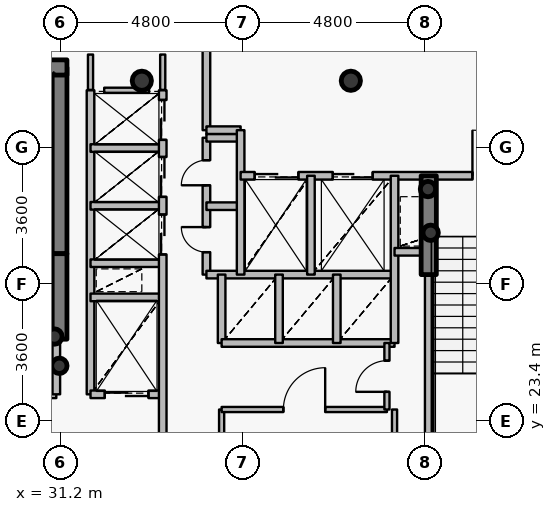
"""IFC4 building model, lengths in metres.
Left out: names, types, materials, properties, quantities, classifications, styles, units other than length and angle.
Written with IfcOpenShell. Run it as: python <this file> out.ifc"""

import sys

from ifc_helpers import new_model, si_unit, direction, frame, frame_2d, origin, origin_2d, place, context, subcontext, project, spatial, rectangle, hollow_circle, extrude, source, transform, mapped, element, fill, save


model = new_model("IFC4")
c1 = context("Model", 3, precision=1e-05, world=origin(), true_north=direction((0.0, 1.0)))
c2 = subcontext(c1, "Body", "Model", "MODEL_VIEW")
j1 = project(units=[si_unit("LENGTHUNIT", "METRE"), si_unit("PLANEANGLEUNIT", "RADIAN")], contexts=[c1])
p1 = place(None, origin())
s1 = spatial("IfcSite", under=j1, at=p1, CompositionType="ELEMENT")
p2 = place(p1, origin())
s2 = spatial("IfcBuilding", under=s1, at=p2, CompositionType="ELEMENT")
p3 = place(p2, frame((0.0, 0.0, 240.3)))
s3 = spatial("IfcBuildingStorey", under=s2, at=p3, CompositionType="ELEMENT", Elevation=240.3)
for number, where, z_axis, x_axis in (
    (1, (38.85, 32.35, 0.0), (0.0, 0.0, 1.0), (1.0, 0.0, 0.0)),
    (2, (33.35, 32.35, 0.0), (0.0, 0.0, 1.0), (1.0, 0.0, 0.0)),
):
    element("IfcColumn", number, at=place(p3, frame(where, z_axis=z_axis, x_axis=x_axis)), inside=s3, PredefinedType="COLUMN", context=c2, shape_type="SweptSolid", body=[
        extrude(hollow_circle(Radius=0.254, WallThickness=0.02, at=origin_2d()), origin(), (0.0, 0.0, 1.0), 3.75),
    ])
p4 = place(p3, frame((31.18, 27.8, 0.0), z_axis=(0.0, 0.0, 1.0), x_axis=(0.0, 1.0, 0.0)))
e3 = element("IfcWall", 3, at=p4, inside=s3, PredefinedType="SHEAR", context=c2, shape_type="SweptSolid", body=[
    extrude(rectangle(XDim=4.9, YDim=0.4, at=frame_2d((2.45, 0.0))), origin(), (0.0, 0.0, 1.0), 3.75),
])
p5 = place(p3, frame((27.28, 32.7, 0.0), z_axis=(0.0, 0.0, 1.0), x_axis=(1.0, 0.0, 0.0)))
e4 = element("IfcWall", 4, at=p5, inside=s3, PredefinedType="SHEAR", context=c2, shape_type="SweptSolid", body=[
    extrude(rectangle(XDim=4.1, YDim=0.4, at=frame_2d((2.05, 0.0))), origin(), (0.0, 0.0, 1.0), 3.75),
])
for number, where, z_axis, x_axis in (
    (5, (31.05, 25.62, 0.0), (0.0, 0.0, 1.0), (1.0, 0.0, 0.0)),
    (6, (31.18, 24.85, 0.0), (0.0, 0.0, 1.0), (1.0, 0.0, 0.0)),
    (7, (40.95, 28.35, 0.0), (0.0, 0.0, 1.0), (1.0, 0.0, 0.0)),
    (8, (40.88, 29.5, 0.0), (0.0, 0.0, 1.0), (1.0, 0.0, 0.0)),
):
    element("IfcColumn", number, at=place(p3, frame(where, z_axis=z_axis, x_axis=x_axis)), inside=s3, PredefinedType="COLUMN", context=c2, shape_type="SweptSolid", body=[
        extrude(hollow_circle(Radius=0.203, WallThickness=0.016, at=origin_2d()), origin(), (0.0, 0.0, 1.0), 3.75),
    ])
p6 = place(p3, frame((31.18, 25.55, 0.0), z_axis=(0.0, 0.0, 1.0), x_axis=(0.0, 1.0, 0.0)))
e9 = element("IfcWall", 9, at=p6, inside=s3, PredefinedType="SHEAR", context=c2, shape_type="SweptSolid", body=[
    extrude(rectangle(XDim=2.25, YDim=0.4, at=frame_2d((1.125, 0.0))), origin(), (0.0, 0.0, 1.0), 3.1),
])
p7 = place(p3, frame((40.9, 27.25, 0.0), z_axis=(0.0, 0.0, 1.0), x_axis=(0.0, 1.0, 0.0)))
e10 = element("IfcWall", 10, at=p7, inside=s3, PredefinedType="SHEAR", context=c2, shape_type="SweptSolid", body=[
    extrude(rectangle(XDim=2.6, YDim=0.4, at=frame_2d((1.3, 0.0))), origin(), (0.0, 0.0, 1.0), 3.1),
])
p8 = place(p3, frame((27.56, 24.1, 0.0), z_axis=(0.0, 0.0, 1.0), x_axis=(1.0, 0.0, 0.0)))
e11 = element("IfcWall", 11, at=p8, inside=s3, PredefinedType="PARTITIONING", context=c2, shape_type="SweptSolid", body=[
    extrude(rectangle(XDim=3.54, YDim=0.2, at=frame_2d((1.77, 0.0))), origin(), (0.0, 0.0, 1.0), 3.5),
])
p9 = place(p8, frame((1.17, 0.0, 0.0)))
e12 = element("IfcOpeningElement", 12, at=p9, cuts=e11, PredefinedType="OPENING", context=c2, shape_type="SweptSolid", body=[
    extrude(rectangle(XDim=1.2, YDim=2.15, at=origin_2d()), frame((0.6, 0.11, 1.075), z_axis=(0.0, -1.0, 0.0), x_axis=(1.0, 0.0, 0.0)), (0.0, 0.0, 1.0), 0.22),
])
p10 = place(p3, frame((31.1, 24.1, 0.0), z_axis=(0.0, 0.0, 1.0), x_axis=(0.0, 1.0, 0.0)))
e13 = element("IfcWall", 13, at=p10, inside=s3, PredefinedType="PARTITIONING", context=c2, shape_type="SweptSolid", body=[
    extrude(rectangle(XDim=1.44, YDim=0.2, at=frame_2d((0.72, 0.0))), origin(), (0.0, 0.0, 1.0), 3.5),
])
p11 = place(p3, frame((32.0, 24.1, 0.0), z_axis=(0.0, 0.0, 1.0), x_axis=(0.0, 1.0, 0.0)))
e14 = element("IfcWall", 14, at=p11, inside=s3, PredefinedType="PARTITIONING", context=c2, shape_type="SweptSolid", body=[
    extrude(rectangle(XDim=8.0, YDim=0.2, at=frame_2d((4.0, 0.0))), origin(), (0.0, 0.0, 1.0), 3.5),
])
p12 = place(p3, frame((32.0, 24.1, 0.0), z_axis=(0.0, 0.0, 1.0), x_axis=(1.0, 0.0, 0.0)))
e15 = element("IfcWall", 15, at=p12, inside=s3, PredefinedType="PARTITIONING", context=c2, shape_type="SweptSolid", body=[
    extrude(rectangle(XDim=1.9, YDim=0.2, at=frame_2d((0.95, 0.0))), origin(), (0.0, 0.0, 1.0), 3.085),
])
p13 = place(p12, frame((0.375, 0.0, 0.0)))
e16 = element("IfcOpeningElement", 16, at=p13, cuts=e15, PredefinedType="OPENING", context=c2, shape_type="SweptSolid", body=[
    extrude(rectangle(XDim=1.15, YDim=2.15, at=origin_2d()), frame((0.575, 0.11, 1.075), z_axis=(0.0, -1.0, 0.0), x_axis=(1.0, 0.0, 0.0)), (0.0, 0.0, 1.0), 0.22),
])
for number, where, z_axis, x_axis in (
    (17, (32.0, 26.65, 0.0), (0.0, 0.0, 1.0), (1.0, 0.0, 0.0)),
    (18, (32.0, 27.55, 0.0), (0.0, 0.0, 1.0), (1.0, 0.0, 0.0)),
    (19, (32.0, 29.06, 0.0), (0.0, 0.0, 1.0), (1.0, 0.0, 0.0)),
    (20, (32.0, 30.58, 0.0), (0.0, 0.0, 1.0), (1.0, 0.0, 0.0)),
):
    element("IfcWall", number, at=place(p3, frame(where, z_axis=z_axis, x_axis=x_axis)), inside=s3, PredefinedType="PARTITIONING", context=c2, shape_type="SweptSolid", body=[
        extrude(rectangle(XDim=1.9, YDim=0.2, at=frame_2d((0.95, 0.0))), origin(), (0.0, 0.0, 1.0), 3.085),
    ])
p14 = place(p3, frame((33.9, 20.7, 0.0), z_axis=(0.0, 0.0, 1.0), x_axis=(0.0, 1.0, 0.0)))
e21 = element("IfcWall", 21, at=p14, inside=s3, PredefinedType="PARTITIONING", context=c2, shape_type="SweptSolid", body=[
    extrude(rectangle(XDim=11.4, YDim=0.2, at=frame_2d((5.7, 0.0))), origin(), (0.0, 0.0, 1.0), 3.085),
])
p15 = place(p14, frame((7.08, 0.0, 0.0)))
e22 = element("IfcOpeningElement", 22, at=p15, cuts=e21, PredefinedType="OPENING", context=c2, shape_type="SweptSolid", body=[
    extrude(rectangle(XDim=1.05, YDim=2.15, at=origin_2d()), frame((0.525, 0.11, 1.075), z_axis=(0.0, -1.0, 0.0), x_axis=(1.0, 0.0, 0.0)), (0.0, 0.0, 1.0), 0.22),
])
p16 = place(p14, frame((8.595, 0.0, 0.0)))
e23 = element("IfcOpeningElement", 23, at=p16, cuts=e21, PredefinedType="OPENING", context=c2, shape_type="SweptSolid", body=[
    extrude(rectangle(XDim=1.05, YDim=2.15, at=origin_2d()), frame((0.525, 0.11, 1.075), z_axis=(0.0, -1.0, 0.0), x_axis=(1.0, 0.0, 0.0)), (0.0, 0.0, 1.0), 0.22),
])
p17 = place(p14, frame((10.095, 0.0, 0.0)))
e24 = element("IfcOpeningElement", 24, at=p17, cuts=e21, PredefinedType="OPENING", context=c2, shape_type="SweptSolid", body=[
    extrude(rectangle(XDim=1.05, YDim=2.15, at=origin_2d()), frame((0.525, 0.11, 1.075), z_axis=(0.0, -1.0, 0.0), x_axis=(1.0, 0.0, 0.0)), (0.0, 0.0, 1.0), 0.22),
])
p18 = place(p3, frame((35.05, 27.25, 0.0), z_axis=(0.0, 0.0, 1.0), x_axis=(0.0, 1.0, 0.0)))
e25 = element("IfcWall", 25, at=p18, inside=s3, PredefinedType="PARTITIONING", context=c2, shape_type="SweptSolid", body=[
    extrude(rectangle(XDim=3.6, YDim=0.2, at=frame_2d((1.8, 0.0))), origin(), (0.0, 0.0, 1.0), 3.5),
])
p19 = place(p18, frame((0.59, 0.0, 0.0)))
e26 = element("IfcOpeningElement", 26, at=p19, cuts=e25, PredefinedType="OPENING", context=c2, shape_type="SweptSolid", body=[
    extrude(rectangle(XDim=0.66, YDim=2.05, at=origin_2d()), frame((0.33, 0.11, 1.025), z_axis=(0.0, -1.0, 0.0), x_axis=(1.0, 0.0, 0.0)), (0.0, 0.0, 1.0), 0.22),
])
p20 = place(p18, frame((2.35, 0.0, 0.0)))
e27 = element("IfcOpeningElement", 27, at=p20, cuts=e25, PredefinedType="OPENING", context=c2, shape_type="SweptSolid", body=[
    extrude(rectangle(XDim=0.66, YDim=2.05, at=origin_2d()), frame((0.33, 0.11, 1.025), z_axis=(0.0, -1.0, 0.0), x_axis=(1.0, 0.0, 0.0)), (0.0, 0.0, 1.0), 0.22),
])
p21 = place(p3, frame((35.05, 27.25, 0.0), z_axis=(0.0, 0.0, 1.0), x_axis=(1.0, 0.0, 0.0)))
e28 = element("IfcWall", 28, at=p21, inside=s3, PredefinedType="PARTITIONING", context=c2, shape_type="SweptSolid", body=[
    extrude(rectangle(XDim=4.95, YDim=0.2, at=frame_2d((2.475, 0.0))), origin(), (0.0, 0.0, 1.0), 3.085),
])
for number, where, z_axis, x_axis in (
    (29, (35.05, 29.05, 0.0), (0.0, 0.0, 1.0), (1.0, 0.0, 0.0)),
    (30, (35.05, 30.85, 0.0), (0.0, 0.0, 1.0), (1.0, 0.0, 0.0)),
):
    element("IfcWall", number, at=place(p3, frame(where, z_axis=z_axis, x_axis=x_axis)), inside=s3, PredefinedType="PARTITIONING", context=c2, shape_type="SweptSolid", body=[
        extrude(rectangle(XDim=0.9, YDim=0.2, at=frame_2d((0.45, 0.0))), origin(), (0.0, 0.0, 1.0), 3.5),
    ])
p22 = place(p3, frame((35.05, 31.05, 0.0), z_axis=(0.0, 0.0, 1.0), x_axis=(0.0, 1.0, 0.0)))
e31 = element("IfcWall", 31, at=p22, inside=s3, PredefinedType="PARTITIONING", context=c2, shape_type="SweptSolid", body=[
    extrude(rectangle(XDim=2.25, YDim=0.2, at=frame_2d((1.125, 0.0))), origin(), (0.0, 0.0, 1.0), 3.085),
])
p23 = place(p3, frame((35.05, 31.05, 0.0), z_axis=(0.0, 0.0, 1.0), x_axis=(1.0, 0.0, 0.0)))
e32 = element("IfcWall", 32, at=p23, inside=s3, PredefinedType="PARTITIONING", context=c2, shape_type="SweptSolid", body=[
    extrude(rectangle(XDim=0.9, YDim=0.2, at=frame_2d((0.45, 0.0))), origin(), (0.0, 0.0, 1.0), 3.5),
])
p24 = place(p3, frame((35.45, 20.7, 0.0), z_axis=(0.0, 0.0, 1.0), x_axis=(0.0, 1.0, 0.0)))
e33 = element("IfcWall", 33, at=p24, inside=s3, PredefinedType="PARTITIONING", context=c2, shape_type="SweptSolid", body=[
    extrude(rectangle(XDim=3.0, YDim=0.135, at=frame_2d((1.5, 0.0))), origin(), (0.0, 0.0, 1.0), 3.085),
])
p25 = place(p3, frame((35.45, 23.7, 0.0), z_axis=(0.0, 0.0, 1.0), x_axis=(1.0, 0.0, 0.0)))
e34 = element("IfcWall", 34, at=p25, inside=s3, PredefinedType="PARTITIONING", context=c2, shape_type="SweptSolid", body=[
    extrude(rectangle(XDim=4.35, YDim=0.135, at=frame_2d((2.175, 0.0))), origin(), (0.0, 0.0, 1.0), 3.085),
])
p26 = place(p25, frame((1.625, 0.0, 0.0)))
e35 = element("IfcOpeningElement", 35, at=p26, cuts=e34, PredefinedType="OPENING", context=c2, shape_type="SweptSolid", body=[
    extrude(rectangle(XDim=1.1, YDim=2.15, at=origin_2d()), frame((0.55, 0.078, 1.075), z_axis=(0.0, -1.0, 0.0), x_axis=(1.0, 0.0, 0.0)), (0.0, 0.0, 1.0), 0.155),
])
p27 = place(p3, frame((35.45, 25.45, 0.0), z_axis=(0.0, 0.0, 1.0), x_axis=(0.0, 1.0, 0.0)))
e36 = element("IfcWall", 36, at=p27, inside=s3, PredefinedType="PARTITIONING", context=c2, shape_type="SweptSolid", body=[
    extrude(rectangle(XDim=1.8, YDim=0.2, at=frame_2d((0.9, 0.0))), origin(), (0.0, 0.0, 1.0), 3.5),
])
p28 = place(p3, frame((35.45, 25.45, 0.0), z_axis=(0.0, 0.0, 1.0), x_axis=(1.0, 0.0, 0.0)))
e37 = element("IfcWall", 37, at=p28, inside=s3, PredefinedType="PARTITIONING", context=c2, shape_type="SweptSolid", body=[
    extrude(rectangle(XDim=4.55, YDim=0.2, at=frame_2d((2.275, 0.0))), origin(), (0.0, 0.0, 1.0), 3.085),
])
p29 = place(p3, frame((35.95, 27.25, 0.0), z_axis=(0.0, 0.0, 1.0), x_axis=(0.0, 1.0, 0.0)))
e38 = element("IfcWall", 38, at=p29, inside=s3, PredefinedType="PARTITIONING", context=c2, shape_type="SweptSolid", body=[
    extrude(rectangle(XDim=3.8, YDim=0.2, at=frame_2d((1.9, 0.0))), origin(), (0.0, 0.0, 1.0), 3.5),
])
p30 = place(p3, frame((35.95, 29.85, 0.0), z_axis=(0.0, 0.0, 1.0), x_axis=(1.0, 0.0, 0.0)))
e39 = element("IfcWall", 39, at=p30, inside=s3, PredefinedType="PARTITIONING", context=c2, shape_type="SweptSolid", body=[
    extrude(rectangle(XDim=8.49, YDim=0.2, at=frame_2d((4.245, 0.0))), origin(), (0.0, 0.0, 1.0), 3.085),
])
p31 = place(p30, frame((6.1, 0.0, 0.0)))
e40 = element("IfcOpeningElement", 40, at=p31, cuts=e39, PredefinedType="OPENING", context=c2, shape_type="SweptSolid", body=[
    extrude(rectangle(XDim=1.2, YDim=2.15, at=origin_2d()), frame((0.6, 0.11, 1.075), z_axis=(0.0, -1.0, 0.0), x_axis=(1.0, 0.0, 0.0)), (0.0, 0.0, 1.0), 0.22),
])
p32 = place(p30, frame((0.37, 0.0, 0.0)))
e41 = element("IfcOpeningElement", 41, at=p32, cuts=e39, PredefinedType="OPENING", context=c2, shape_type="SweptSolid", body=[
    extrude(rectangle(XDim=1.15, YDim=2.15, at=origin_2d()), frame((0.575, 0.11, 1.075), z_axis=(0.0, -1.0, 0.0), x_axis=(1.0, 0.0, 0.0)), (0.0, 0.0, 1.0), 0.22),
])
p33 = place(p30, frame((2.425, 0.0, 0.0)))
e42 = element("IfcOpeningElement", 42, at=p33, cuts=e39, PredefinedType="OPENING", context=c2, shape_type="SweptSolid", body=[
    extrude(rectangle(XDim=1.05, YDim=2.15, at=origin_2d()), frame((0.525, 0.11, 1.075), z_axis=(0.0, -1.0, 0.0), x_axis=(1.0, 0.0, 0.0)), (0.0, 0.0, 1.0), 0.22),
])
p34 = place(p3, frame((36.96, 25.45, 0.0), z_axis=(0.0, 0.0, 1.0), x_axis=(0.0, 1.0, 0.0)))
e43 = element("IfcWall", 43, at=p34, inside=s3, PredefinedType="PARTITIONING", context=c2, shape_type="SweptSolid", body=[
    extrude(rectangle(XDim=1.8, YDim=0.2, at=frame_2d((0.9, 0.0))), origin(), (0.0, 0.0, 1.0), 3.5),
])
p35 = place(p3, frame((37.8, 27.25, 0.0), z_axis=(0.0, 0.0, 1.0), x_axis=(0.0, 1.0, 0.0)))
e44 = element("IfcWall", 44, at=p35, inside=s3, PredefinedType="PARTITIONING", context=c2, shape_type="SweptSolid", body=[
    extrude(rectangle(XDim=2.6, YDim=0.2, at=frame_2d((1.3, 0.0))), origin(), (0.0, 0.0, 1.0), 3.5),
])
p36 = place(p3, frame((38.48, 25.45, 0.0), z_axis=(0.0, 0.0, 1.0), x_axis=(0.0, 1.0, 0.0)))
e45 = element("IfcWall", 45, at=p36, inside=s3, PredefinedType="PARTITIONING", context=c2, shape_type="SweptSolid", body=[
    extrude(rectangle(XDim=1.8, YDim=0.2, at=frame_2d((0.9, 0.0))), origin(), (0.0, 0.0, 1.0), 3.5),
])
p37 = place(p3, frame((39.8, 23.7, 0.0), z_axis=(0.0, 0.0, 1.0), x_axis=(0.0, 1.0, 0.0)))
e46 = element("IfcWall", 46, at=p37, inside=s3, PredefinedType="PARTITIONING", context=c2, shape_type="SweptSolid", body=[
    extrude(rectangle(XDim=1.75, YDim=0.135, at=frame_2d((0.875, 0.0))), origin(), (0.0, 0.0, 1.0), 3.5),
])
p38 = place(p37, frame((0.465, 0.0, 0.0)))
e47 = element("IfcOpeningElement", 47, at=p38, cuts=e46, PredefinedType="OPENING", context=c2, shape_type="SweptSolid", body=[
    extrude(rectangle(XDim=0.82, YDim=2.1, at=origin_2d()), frame((0.41, 0.078, 1.05), z_axis=(0.0, -1.0, 0.0), x_axis=(1.0, 0.0, 0.0)), (0.0, 0.0, 1.0), 0.155),
])
p39 = place(p3, frame((40.0, 25.45, 0.0), z_axis=(0.0, 0.0, 1.0), x_axis=(0.0, 1.0, 0.0)))
e48 = element("IfcWall", 48, at=p39, inside=s3, PredefinedType="PARTITIONING", context=c2, shape_type="SweptSolid", body=[
    extrude(rectangle(XDim=4.4, YDim=0.2, at=frame_2d((2.2, 0.0))), origin(), (0.0, 0.0, 1.0), 3.5),
])
p40 = place(p3, frame((40.0, 27.85, 0.0), z_axis=(0.0, 0.0, 1.0), x_axis=(1.0, 0.0, 0.0)))
e49 = element("IfcWall", 49, at=p40, inside=s3, PredefinedType="PARTITIONING", context=c2, shape_type="SweptSolid", body=[
    extrude(rectangle(XDim=0.9, YDim=0.2, at=frame_2d((0.45, 0.0))), origin(), (0.0, 0.0, 1.0), 3.5),
])
p41 = place(p3, frame((40.9, 21.33, 0.0), z_axis=(0.0, 0.0, 1.0), x_axis=(0.0, 1.0, 0.0)))
e50 = element("IfcWall", 50, at=p41, inside=s3, PredefinedType="PARTITIONING", context=c2, shape_type="SweptSolid", body=[
    extrude(rectangle(XDim=5.91, YDim=0.2, at=frame_2d((2.955, 0.0))), origin(), (0.0, 0.0, 1.0), 3.035),
])
p42 = place(p3, frame((32.36, 32.1, 0.0), z_axis=(0.0, 0.0, 1.0), x_axis=(1.0, 0.0, 0.0)))
e51 = element("IfcWall", 51, at=p42, inside=s3, PredefinedType="PARTITIONING", context=c2, shape_type="SweptSolid", body=[
    extrude(rectangle(XDim=1.18, YDim=0.135, at=frame_2d((0.59, 0.0))), origin(), (0.0, 0.0, 1.0), 3.085),
])
p43 = place(p3, frame((40.0, 23.7, 0.0), z_axis=(0.0, 0.0, 1.0), x_axis=(0.0, -1.0, 0.0)))
e52 = element("IfcWall", 52, at=p43, inside=s3, PredefinedType="PARTITIONING", context=c2, shape_type="SweptSolid", body=[
    extrude(rectangle(XDim=2.74, YDim=0.135, at=frame_2d((1.37, 0.0))), origin(), (0.0, 0.0, 1.0), 3.035),
])
p44 = place(p3, frame((32.0, 33.04, 0.0), z_axis=(0.0, 0.0, 1.0), x_axis=(0.0, -1.0, 0.0)))
e53 = element("IfcWall", 53, at=p44, inside=s3, PredefinedType="PARTITIONING", context=c2, shape_type="SweptSolid", body=[
    extrude(rectangle(XDim=0.93, YDim=0.135, at=frame_2d((0.465, 0.0))), origin(), (0.0, 0.0, 1.0), 3.035),
])
p45 = place(p3, frame((33.9, 32.11, 0.0), z_axis=(0.0, 0.0, 1.0), x_axis=(0.0, 1.0, 0.0)))
e54 = element("IfcWall", 54, at=p45, inside=s3, PredefinedType="PARTITIONING", context=c2, shape_type="SweptSolid", body=[
    extrude(rectangle(XDim=0.93, YDim=0.135, at=frame_2d((0.465, 0.0))), origin(), (0.0, 0.0, 1.0), 3.085),
])
m1 = source(origin(), c2, "Body", "SweptSolid", [
    extrude(rectangle(XDim=1.2, YDim=2.15, at=origin_2d()), frame((0.6, 0.025, 1.075), z_axis=(0.0, -1.0, 0.0), x_axis=(1.0, 0.0, 0.0)), (0.0, 0.0, 1.0), 0.05),
])
p46 = place(p31, origin())
e55 = element("IfcDoor", 55, at=p46, inside=s3, OperationType="SINGLE_SWING_LEFT", PredefinedType="DOOR", context=c2, shape_type="MappedRepresentation", body=[
    mapped(m1, transform((0.0, 0.0, 0.0), x_axis=(1.0, 0.0, 0.0), y_axis=(0.0, 1.0, 0.0), z_axis=(0.0, 0.0, 1.0), scale=1.0)),
])
fill(e40, e55)
m2 = source(origin(), c2, "Body", "SweptSolid", [
    extrude(rectangle(XDim=1.15, YDim=2.15, at=origin_2d()), frame((0.575, 0.025, 1.075), z_axis=(0.0, -1.0, 0.0), x_axis=(1.0, 0.0, 0.0)), (0.0, 0.0, 1.0), 0.05),
])
p47 = place(p32, origin())
e56 = element("IfcDoor", 56, at=p47, inside=s3, OperationType="DOUBLE_DOOR_SLIDING", PredefinedType="USERDEFINED", context=c2, shape_type="MappedRepresentation", body=[
    mapped(m2, transform((0.0, 0.0, 0.0), x_axis=(1.0, 0.0, 0.0), y_axis=(0.0, 1.0, 0.0), z_axis=(0.0, 0.0, 1.0), scale=1.0)),
])
fill(e41, e56)
p48 = place(p13, origin())
e57 = element("IfcDoor", 57, at=p48, inside=s3, OperationType="DOUBLE_DOOR_SLIDING", PredefinedType="USERDEFINED", context=c2, shape_type="MappedRepresentation", body=[
    mapped(m2, transform((0.0, 0.0, 0.0), x_axis=(1.0, 0.0, 0.0), y_axis=(0.0, 1.0, 0.0), z_axis=(0.0, 0.0, 1.0), scale=1.0)),
])
fill(e16, e57)
m3 = source(origin(), c2, "Body", "SweptSolid", [
    extrude(rectangle(XDim=1.05, YDim=2.15, at=origin_2d()), frame((0.525, 0.025, 1.075), z_axis=(0.0, -1.0, 0.0), x_axis=(1.0, 0.0, 0.0)), (0.0, 0.0, 1.0), 0.05),
])
p49 = place(p33, origin())
e58 = element("IfcDoor", 58, at=p49, inside=s3, OperationType="DOUBLE_DOOR_SLIDING", PredefinedType="USERDEFINED", context=c2, shape_type="MappedRepresentation", body=[
    mapped(m3, transform((0.0, 0.0, 0.0), x_axis=(1.0, 0.0, 0.0), y_axis=(0.0, 1.0, 0.0), z_axis=(0.0, 0.0, 1.0), scale=1.0)),
])
fill(e42, e58)
p50 = place(p15, origin())
e59 = element("IfcDoor", 59, at=p50, inside=s3, OperationType="DOUBLE_DOOR_SLIDING", PredefinedType="USERDEFINED", context=c2, shape_type="MappedRepresentation", body=[
    mapped(m3, transform((0.0, 0.0, 0.0), x_axis=(1.0, 0.0, 0.0), y_axis=(0.0, 1.0, 0.0), z_axis=(0.0, 0.0, 1.0), scale=1.0)),
])
fill(e22, e59)
p51 = place(p16, origin())
e60 = element("IfcDoor", 60, at=p51, inside=s3, OperationType="DOUBLE_DOOR_SLIDING", PredefinedType="USERDEFINED", context=c2, shape_type="MappedRepresentation", body=[
    mapped(m3, transform((0.0, 0.0, 0.0), x_axis=(1.0, 0.0, 0.0), y_axis=(0.0, 1.0, 0.0), z_axis=(0.0, 0.0, 1.0), scale=1.0)),
])
fill(e23, e60)
p52 = place(p17, origin())
e61 = element("IfcDoor", 61, at=p52, inside=s3, OperationType="DOUBLE_DOOR_SLIDING", PredefinedType="USERDEFINED", context=c2, shape_type="MappedRepresentation", body=[
    mapped(m3, transform((0.0, 0.0, 0.0), x_axis=(1.0, 0.0, 0.0), y_axis=(0.0, 1.0, 0.0), z_axis=(0.0, 0.0, 1.0), scale=1.0)),
])
fill(e24, e61)
m4 = source(origin(), c2, "Body", "SweptSolid", [
    extrude(rectangle(XDim=0.66, YDim=2.05, at=origin_2d()), frame((0.33, 0.025, 1.025), z_axis=(0.0, -1.0, 0.0), x_axis=(1.0, 0.0, 0.0)), (0.0, 0.0, 1.0), 0.05),
])
p53 = place(p19, origin())
e62 = element("IfcDoor", 62, at=p53, inside=s3, OperationType="SINGLE_SWING_RIGHT", PredefinedType="USERDEFINED", context=c2, shape_type="MappedRepresentation", body=[
    mapped(m4, transform((0.0, 0.0, 0.0), x_axis=(1.0, 0.0, 0.0), y_axis=(0.0, 1.0, 0.0), z_axis=(0.0, 0.0, 1.0), scale=1.0)),
])
fill(e26, e62)
p54 = place(p20, origin())
e63 = element("IfcDoor", 63, at=p54, inside=s3, OperationType="SINGLE_SWING_LEFT", PredefinedType="USERDEFINED", context=c2, shape_type="MappedRepresentation", body=[
    mapped(m4, transform((0.0, 0.0, 0.0), x_axis=(1.0, 0.0, 0.0), y_axis=(0.0, 1.0, 0.0), z_axis=(0.0, 0.0, 1.0), scale=1.0)),
])
fill(e27, e63)
m5 = source(origin(), c2, "Body", "SweptSolid", [
    extrude(rectangle(XDim=1.1, YDim=2.15, at=origin_2d()), frame((0.55, 0.025, 1.075), z_axis=(0.0, -1.0, 0.0), x_axis=(1.0, 0.0, 0.0)), (0.0, 0.0, 1.0), 0.05),
])
p55 = place(p26, origin())
e64 = element("IfcDoor", 64, at=p55, inside=s3, OperationType="SINGLE_SWING_RIGHT", PredefinedType="DOOR", context=c2, shape_type="MappedRepresentation", body=[
    mapped(m5, transform((0.0, 0.0, 0.0), x_axis=(1.0, 0.0, 0.0), y_axis=(0.0, 1.0, 0.0), z_axis=(0.0, 0.0, 1.0), scale=1.0)),
])
fill(e35, e64)
m6 = source(origin(), c2, "Body", "SweptSolid", [
    extrude(rectangle(XDim=0.82, YDim=2.1, at=origin_2d()), frame((0.41, 0.025, 1.05), z_axis=(0.0, -1.0, 0.0), x_axis=(1.0, 0.0, 0.0)), (0.0, 0.0, 1.0), 0.05),
])
p56 = place(p38, origin())
e65 = element("IfcDoor", 65, at=p56, inside=s3, OperationType="SINGLE_SWING_LEFT", PredefinedType="DOOR", context=c2, shape_type="MappedRepresentation", body=[
    mapped(m6, transform((0.0, 0.0, 0.0), x_axis=(1.0, 0.0, 0.0), y_axis=(0.0, 1.0, 0.0), z_axis=(0.0, 0.0, 1.0), scale=1.0)),
])
fill(e47, e65)
save(model, sys.argv[1])
